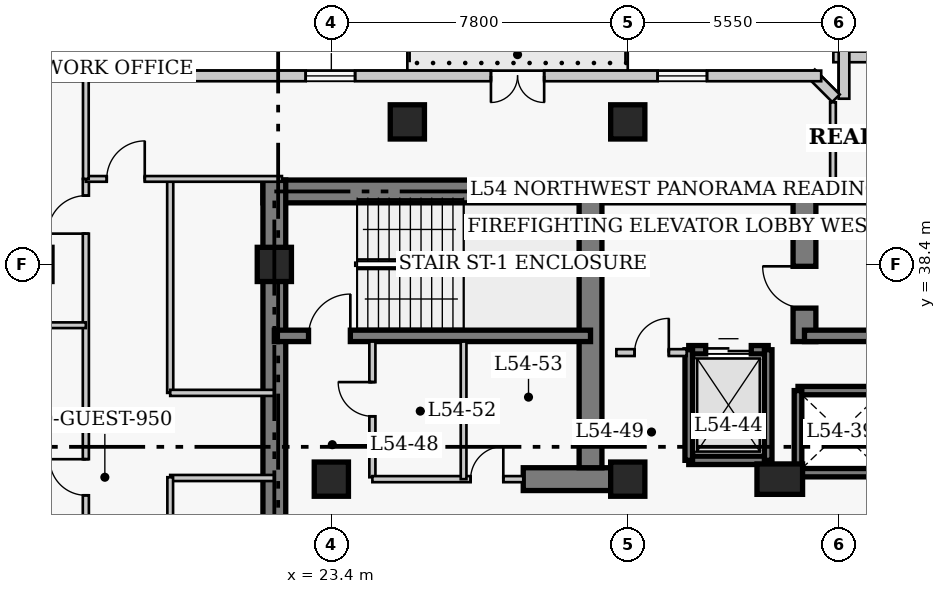
"""IFC4 building model, lengths in metres.
Left out: names, types, materials, properties, quantities, classifications, styles, units other than length and angle.
Written with IfcOpenShell. Run it as: python <this file> out.ifc"""

import sys

from ifc_helpers import new_model, si_unit, direction, frame, frame_2d, origin, origin_2d, place, context, subcontext, project, spatial, rectangle, extrude, element, fill, save


model = new_model("IFC4")
c1 = context("Model", 3, precision=1e-05, world=origin(), true_north=direction((0.0, 1.0)))
c2 = subcontext(c1, "Body", "Model", "MODEL_VIEW")
j1 = project(units=[si_unit("LENGTHUNIT", "METRE"), si_unit("PLANEANGLEUNIT", "RADIAN")], contexts=[c1])
p1 = place(None, origin())
s1 = spatial("IfcSite", under=j1, at=p1, CompositionType="ELEMENT")
p2 = place(p1, origin())
s2 = spatial("IfcBuilding", under=s1, at=p2, CompositionType="ELEMENT")
p3 = place(p2, frame((0.0, 0.0, 216.3)))
s3 = spatial("IfcBuildingStorey", under=s2, at=p3, CompositionType="ELEMENT", Elevation=216.3)
p4 = place(p3, frame((21.6, 40.32, 0.0), z_axis=(0.0, 0.0, 1.0), x_axis=(1.0, 0.0, 0.0)))
e1 = element("IfcWall", 1, at=p4, inside=s3, PredefinedType="SHEAR", context=c2, shape_type="SweptSolid", body=[
    extrude(rectangle(XDim=14.25, YDim=0.6, at=frame_2d((7.125, 0.0))), origin(), (0.0, 0.0, 1.0), 3.9),
])
p5 = place(p3, frame((35.85, 40.32, 0.0), z_axis=(0.0, 0.0, 1.0), x_axis=(1.0, 0.0, 0.0)))
e2 = element("IfcWall", 2, at=p5, inside=s3, PredefinedType="SHEAR", context=c2, shape_type="SweptSolid", body=[
    extrude(rectangle(XDim=12.6, YDim=0.6, at=frame_2d((6.3, 0.0))), origin(), (0.0, 0.0, 1.0), 3.9),
])
p6 = place(p3, frame((21.9, 27.05, 0.0), z_axis=(0.0, 0.0, 1.0), x_axis=(0.0, 1.0, 0.0)))
e3 = element("IfcWall", 3, at=p6, inside=s3, PredefinedType="SHEAR", context=c2, shape_type="SweptSolid", body=[
    extrude(rectangle(XDim=13.57, YDim=0.6, at=frame_2d((6.785, 0.0))), origin(), (0.0, 0.0, 1.0), 3.9),
])
p7 = place(p3, frame((28.45, 32.75, 0.0), z_axis=(0.0, 0.0, 1.0), x_axis=(1.0, 0.0, 0.0)))
e4 = element("IfcWall", 4, at=p7, inside=s3, PredefinedType="SHEAR", context=c2, shape_type="SweptSolid", body=[
    extrude(rectangle(XDim=2.4, YDim=0.6, at=frame_2d((1.2, 0.0))), origin(), (0.0, 0.0, 1.0), 3.9),
])
p8 = place(p3, frame((30.22, 33.05, 0.0), z_axis=(0.0, 0.0, 1.0), x_axis=(0.0, 1.0, 0.0)))
e5 = element("IfcWall", 5, at=p8, inside=s3, PredefinedType="SHEAR", context=c2, shape_type="SweptSolid", body=[
    extrude(rectangle(XDim=7.27, YDim=0.6, at=frame_2d((3.635, 0.0))), origin(), (0.0, 0.0, 1.0), 3.9),
])
p9 = place(p3, frame((35.85, 36.37, 0.0), z_axis=(0.0, 0.0, 1.0), x_axis=(0.0, 1.0, 0.0)))
e6 = element("IfcWall", 6, at=p9, inside=s3, PredefinedType="SHEAR", context=c2, shape_type="SweptSolid", body=[
    extrude(rectangle(XDim=3.95, YDim=0.6, at=frame_2d((1.975, 0.0))), origin(), (0.0, 0.0, 1.0), 3.9),
])
p10 = place(p9, frame((0.88, 0.0, 0.0)))
e7 = element("IfcOpeningElement", 7, at=p10, cuts=e6, PredefinedType="OPENING", context=c2, shape_type="SweptSolid", body=[
    extrude(rectangle(XDim=1.1, YDim=2.15, at=frame_2d((0.55, 1.075))), frame((0.0, 0.31, 0.0), z_axis=(0.0, -1.0, 0.0), x_axis=(1.0, 0.0, 0.0)), (0.0, 0.0, 1.0), 0.62),
])
p11 = place(p3, frame((21.9, 36.52, 0.0), z_axis=(0.0, 0.0, 1.0), x_axis=(1.0, 0.0, 0.0)))
e8 = element("IfcWall", 8, at=p11, inside=s3, PredefinedType="SHEAR", context=c2, shape_type="SweptSolid", body=[
    extrude(rectangle(XDim=8.32, YDim=0.3, at=frame_2d((4.16, 0.0))), origin(), (0.0, 0.0, 1.0), 3.9),
])
p12 = place(p11, frame((0.9, 0.0, 0.0)))
e9 = element("IfcOpeningElement", 9, at=p12, cuts=e8, PredefinedType="OPENING", context=c2, shape_type="SweptSolid", body=[
    extrude(rectangle(XDim=1.1, YDim=2.15, at=frame_2d((0.55, 1.075))), frame((0.0, 0.16, 0.0), z_axis=(0.0, -1.0, 0.0), x_axis=(1.0, 0.0, 0.0)), (0.0, 0.0, 1.0), 0.32),
])
p13 = place(p3, frame((35.85, 36.52, 0.0), z_axis=(0.0, 0.0, 1.0), x_axis=(1.0, 0.0, 0.0)))
e10 = element("IfcWall", 10, at=p13, inside=s3, PredefinedType="SHEAR", context=c2, shape_type="SweptSolid", body=[
    extrude(rectangle(XDim=8.33, YDim=0.3, at=frame_2d((4.165, 0.0))), origin(), (0.0, 0.0, 1.0), 3.9),
])
for number, where, z_axis, x_axis in (
    (11, (21.9, 38.4, 0.0), (0.0, 0.0, 1.0), (1.0, 0.0, 0.0)),
    (12, (23.4, 32.75, 0.0), (0.0, 0.0, 1.0), (1.0, 0.0, 0.0)),
    (13, (31.2, 32.75, 0.0), (0.0, 0.0, 1.0), (1.0, 0.0, 0.0)),
):
    element("IfcColumn", number, at=place(p3, frame(where, z_axis=z_axis, x_axis=x_axis)), inside=s3, PredefinedType="COLUMN", context=c2, shape_type="SweptSolid", body=[
        extrude(rectangle(XDim=0.9, YDim=0.9, at=origin_2d()), origin(), (0.0, 0.0, 1.0), 3.9),
    ])
p14 = place(p3, frame((35.2, 32.75, 0.0), z_axis=(0.0, 0.0, 1.0), x_axis=(1.0, 0.0, 0.0)))
e14 = element("IfcColumn", 14, at=p14, inside=s3, PredefinedType="COLUMN", context=c2, shape_type="SweptSolid", body=[
    extrude(rectangle(XDim=1.2, YDim=0.8, at=origin_2d()), origin(), (0.0, 0.0, 1.0), 3.9),
])
for number, where, z_axis, x_axis in (
    (15, (25.4, 42.15, 0.0), (0.0, 0.0, 1.0), (1.0, 0.0, 0.0)),
    (16, (31.2, 42.15, 0.0), (0.0, 0.0, 1.0), (1.0, 0.0, 0.0)),
):
    element("IfcColumn", number, at=place(p3, frame(where, z_axis=z_axis, x_axis=x_axis)), inside=s3, PredefinedType="COLUMN", context=c2, shape_type="SweptSolid", body=[
        extrude(rectangle(XDim=0.9, YDim=0.9, at=origin_2d()), origin(), (0.0, 0.0, 1.0), 3.9),
    ])
p15 = place(p3, frame((41.39, 43.86, 0.0), z_axis=(0.0, 0.0, 1.0), x_axis=(-1.0, 0.0, 0.0)))
e17 = element("IfcWall", 17, at=p15, inside=s3, PredefinedType="SOLIDWALL", context=c2, shape_type="SweptSolid", body=[
    extrude(rectangle(XDim=4.78, YDim=0.28, at=frame_2d((2.39, 0.0))), origin(), (0.0, 0.0, 1.0), 3.65),
])
p16 = place(p15, frame((1.74, 0.0, 0.85)))
e18 = element("IfcOpeningElement", 18, at=p16, cuts=e17, PredefinedType="OPENING", context=c2, shape_type="SweptSolid", body=[
    extrude(rectangle(XDim=1.3, YDim=1.7, at=frame_2d((0.65, 0.85))), frame((0.0, 0.15, 0.0), z_axis=(0.0, -1.0, 0.0), x_axis=(1.0, 0.0, 0.0)), (0.0, 0.0, 1.0), 0.3),
])
p17 = place(p3, frame((36.89, 44.14, 0.0), z_axis=(0.0, 0.0, 1.0), x_axis=(0.0, -1.0, 0.0)))
e19 = element("IfcWall", 19, at=p17, inside=s3, PredefinedType="SOLIDWALL", context=c2, shape_type="SweptSolid", body=[
    extrude(rectangle(XDim=1.38, YDim=0.28, at=frame_2d((0.69, 0.0))), origin(), (0.0, 0.0, 1.0), 3.65),
])
p18 = place(p3, frame((36.679, 42.773, 0.0), z_axis=(0.0, 0.0, 1.0), x_axis=(-0.707106781187, 0.707106781187, 0.0)))
e20 = element("IfcWall", 20, at=p18, inside=s3, PredefinedType="SOLIDWALL", context=c2, shape_type="SweptSolid", body=[
    extrude(rectangle(XDim=0.928, YDim=0.28, at=frame_2d((0.464, 0.0))), origin(), (0.0, 0.0, 1.0), 3.65),
])
p19 = place(p3, frame((36.29, 43.36, 0.0), z_axis=(0.0, 0.0, 1.0), x_axis=(-1.0, 0.0, 0.0)))
e21 = element("IfcWall", 21, at=p19, inside=s3, PredefinedType="SOLIDWALL", context=c2, shape_type="SweptSolid", body=[
    extrude(rectangle(XDim=25.83, YDim=0.28, at=frame_2d((12.915, 0.0))), origin(), (0.0, 0.0, 1.0), 3.65),
])
p20 = place(p19, frame((7.29, 0.0, 0.0)))
e22 = element("IfcOpeningElement", 22, at=p20, cuts=e21, PredefinedType="OPENING", context=c2, shape_type="SweptSolid", body=[
    extrude(rectangle(XDim=1.4, YDim=2.15, at=frame_2d((0.7, 1.075))), frame((0.0, 0.15, 0.0), z_axis=(0.0, -1.0, 0.0), x_axis=(1.0, 0.0, 0.0)), (0.0, 0.0, 1.0), 0.3),
])
p21 = place(p19, frame((3.005, 0.0, 0.85)))
e23 = element("IfcOpeningElement", 23, at=p21, cuts=e21, PredefinedType="OPENING", context=c2, shape_type="SweptSolid", body=[
    extrude(rectangle(XDim=1.3, YDim=1.7, at=frame_2d((0.65, 0.85))), frame((0.0, 0.15, 0.0), z_axis=(0.0, -1.0, 0.0), x_axis=(1.0, 0.0, 0.0)), (0.0, 0.0, 1.0), 0.3),
])
p22 = place(p19, frame((12.265, 0.0, 0.85)))
e24 = element("IfcOpeningElement", 24, at=p22, cuts=e21, PredefinedType="OPENING", context=c2, shape_type="SweptSolid", body=[
    extrude(rectangle(XDim=1.3, YDim=1.7, at=frame_2d((0.65, 0.85))), frame((0.0, 0.15, 0.0), z_axis=(0.0, -1.0, 0.0), x_axis=(1.0, 0.0, 0.0)), (0.0, 0.0, 1.0), 0.3),
])
p23 = place(p19, frame((20.875, 0.0, 0.85)))
e25 = element("IfcOpeningElement", 25, at=p23, cuts=e21, PredefinedType="OPENING", context=c2, shape_type="SweptSolid", body=[
    extrude(rectangle(XDim=1.3, YDim=1.7, at=frame_2d((0.65, 0.85))), frame((0.0, 0.15, 0.0), z_axis=(0.0, -1.0, 0.0), x_axis=(1.0, 0.0, 0.0)), (0.0, 0.0, 1.0), 0.3),
])
for number, where, z_axis, x_axis in (
    (26, (35.68, 35.08, 0.0), (0.0, 0.0, 1.0), (1.0, 0.0, 0.0)),
    (27, (35.68, 32.92, 0.0), (0.0, 0.0, 1.0), (1.0, 0.0, 0.0)),
):
    element("IfcWall", number, at=place(p3, frame(where, z_axis=z_axis, x_axis=x_axis)), inside=s3, PredefinedType="SHEAR", context=c2, shape_type="SweptSolid", body=[
        extrude(rectangle(XDim=2.32, YDim=0.22, at=frame_2d((1.16, 0.0))), origin(), (0.0, 0.0, 1.0), 3.9),
    ])
p24 = place(p3, frame((35.68, 32.92, 0.0), z_axis=(0.0, 0.0, 1.0), x_axis=(0.0, 1.0, 0.0)))
e28 = element("IfcWall", 28, at=p24, inside=s3, PredefinedType="SHEAR", context=c2, shape_type="SweptSolid", body=[
    extrude(rectangle(XDim=2.16, YDim=0.2, at=frame_2d((1.08, 0.0))), origin(), (0.0, 0.0, 1.0), 3.9),
])
p25 = place(p3, frame((32.805, 36.155, 0.0), z_axis=(0.0, 0.0, 1.0), x_axis=(1.0, 0.0, 0.0)))
e29 = element("IfcWall", 29, at=p25, inside=s3, PredefinedType="SHEAR", context=c2, shape_type="SweptSolid", body=[
    extrude(rectangle(XDim=2.09, YDim=0.22, at=frame_2d((1.045, 0.0))), origin(), (0.0, 0.0, 1.0), 3.9),
])
p26 = place(p25, frame((0.445, 0.0, 0.0)))
e30 = element("IfcOpeningElement", 30, at=p26, cuts=e29, PredefinedType="OPENING", context=c2, shape_type="SweptSolid", body=[
    extrude(rectangle(XDim=1.2, YDim=2.15, at=frame_2d((0.6, 1.075))), frame((0.0, 0.12, 0.0), z_axis=(0.0, -1.0, 0.0), x_axis=(1.0, 0.0, 0.0)), (0.0, 0.0, 1.0), 0.24),
])
p27 = place(p3, frame((32.805, 33.245, 0.0), z_axis=(0.0, 0.0, 1.0), x_axis=(1.0, 0.0, 0.0)))
e31 = element("IfcWall", 31, at=p27, inside=s3, PredefinedType="SHEAR", context=c2, shape_type="SweptSolid", body=[
    extrude(rectangle(XDim=2.09, YDim=0.22, at=frame_2d((1.045, 0.0))), origin(), (0.0, 0.0, 1.0), 3.9),
])
for number, where, z_axis, x_axis in (
    (32, (32.805, 33.245, 0.0), (0.0, 0.0, 1.0), (0.0, 1.0, 0.0)),
    (33, (34.895, 33.245, 0.0), (0.0, 0.0, 1.0), (0.0, 1.0, 0.0)),
):
    element("IfcWall", number, at=place(p3, frame(where, z_axis=z_axis, x_axis=x_axis)), inside=s3, PredefinedType="SHEAR", context=c2, shape_type="SweptSolid", body=[
        extrude(rectangle(XDim=2.91, YDim=0.2, at=frame_2d((1.455, 0.0))), origin(), (0.0, 0.0, 1.0), 3.9),
    ])
p28 = place(p3, frame((30.9, 36.08, 0.0), z_axis=(0.0, 0.0, 1.0), x_axis=(1.0, 0.0, 0.0)))
e34 = element("IfcWall", 34, at=p28, inside=s3, PredefinedType="PARTITIONING", context=c2, shape_type="SweptSolid", body=[
    extrude(rectangle(XDim=1.85, YDim=0.18, at=frame_2d((0.925, 0.0))), origin(), (0.0, 0.0, 1.0), 3.65),
])
p29 = place(p28, frame((0.48, 0.0, 0.0)))
e35 = element("IfcOpeningElement", 35, at=p29, cuts=e34, PredefinedType="OPENING", context=c2, shape_type="SweptSolid", body=[
    extrude(rectangle(XDim=0.9, YDim=2.15, at=frame_2d((0.45, 1.075))), frame((0.0, 0.1, 0.0), z_axis=(0.0, -1.0, 0.0), x_axis=(1.0, 0.0, 0.0)), (0.0, 0.0, 1.0), 0.2),
])
p30 = place(p3, frame((24.48, 32.8, 0.0), z_axis=(0.0, 0.0, 1.0), x_axis=(0.0, 1.0, 0.0)))
e36 = element("IfcWall", 36, at=p30, inside=s3, PredefinedType="PARTITIONING", context=c2, shape_type="SweptSolid", body=[
    extrude(rectangle(XDim=3.57, YDim=0.16, at=frame_2d((1.785, 0.0))), origin(), (0.0, 0.0, 1.0), 3.65),
])
p31 = place(p30, frame((1.604, 0.0, 0.0)))
e37 = element("IfcOpeningElement", 37, at=p31, cuts=e36, PredefinedType="OPENING", context=c2, shape_type="SweptSolid", body=[
    extrude(rectangle(XDim=0.9, YDim=2.1, at=frame_2d((0.45, 1.05))), frame((0.0, 0.09, 0.0), z_axis=(0.0, -1.0, 0.0), x_axis=(1.0, 0.0, 0.0)), (0.0, 0.0, 1.0), 0.18),
])
p32 = place(p3, frame((24.48, 32.75, 0.0), z_axis=(0.0, 0.0, 1.0), x_axis=(1.0, 0.0, 0.0)))
e38 = element("IfcWall", 38, at=p32, inside=s3, PredefinedType="PARTITIONING", context=c2, shape_type="SweptSolid", body=[
    extrude(rectangle(XDim=3.97, YDim=0.16, at=frame_2d((1.985, 0.0))), origin(), (0.0, 0.0, 1.0), 3.65),
])
p33 = place(p32, frame((2.585, 0.0, 0.0)))
e39 = element("IfcOpeningElement", 39, at=p33, cuts=e38, PredefinedType="OPENING", context=c2, shape_type="SweptSolid", body=[
    extrude(rectangle(XDim=0.86, YDim=2.05, at=frame_2d((0.43, 1.025))), frame((0.0, 0.09, 0.0), z_axis=(0.0, -1.0, 0.0), x_axis=(1.0, 0.0, 0.0)), (0.0, 0.0, 1.0), 0.18),
])
p34 = place(p3, frame((26.88, 32.75, 0.0), z_axis=(0.0, 0.0, 1.0), x_axis=(0.0, 1.0, 0.0)))
e40 = element("IfcWall", 40, at=p34, inside=s3, PredefinedType="PARTITIONING", context=c2, shape_type="SweptSolid", body=[
    extrude(rectangle(XDim=3.62, YDim=0.15, at=frame_2d((1.81, 0.0))), origin(), (0.0, 0.0, 1.0), 3.65),
])
p35 = place(p3, frame((16.94, 7.55, 0.0), z_axis=(0.0, 0.0, 1.0), x_axis=(0.0, 1.0, 0.0)))
e41 = element("IfcWall", 41, at=p35, inside=s3, PredefinedType="PARTITIONING", context=c2, shape_type="SweptSolid", body=[
    extrude(rectangle(XDim=33.1, YDim=0.16, at=frame_2d((16.55, 0.0))), origin(), (0.0, 0.0, 1.0), 3.65),
])
p36 = place(p35, frame((0.46, 0.0, 0.0)))
e42 = element("IfcOpeningElement", 42, at=p36, cuts=e41, PredefinedType="OPENING", context=c2, shape_type="SweptSolid", body=[
    extrude(rectangle(XDim=0.95, YDim=2.1, at=frame_2d((0.475, 1.05))), frame((0.0, 0.09, 0.0), z_axis=(0.0, -1.0, 0.0), x_axis=(1.0, 0.0, 0.0)), (0.0, 0.0, 1.0), 0.18),
])
p37 = place(p35, frame((7.575, 0.0, 0.0)))
e43 = element("IfcOpeningElement", 43, at=p37, cuts=e41, PredefinedType="OPENING", context=c2, shape_type="SweptSolid", body=[
    extrude(rectangle(XDim=0.95, YDim=2.1, at=frame_2d((0.475, 1.05))), frame((0.0, 0.09, 0.0), z_axis=(0.0, -1.0, 0.0), x_axis=(1.0, 0.0, 0.0)), (0.0, 0.0, 1.0), 0.18),
])
p38 = place(p35, frame((16.375, 0.0, 0.0)))
e44 = element("IfcOpeningElement", 44, at=p38, cuts=e41, PredefinedType="OPENING", context=c2, shape_type="SweptSolid", body=[
    extrude(rectangle(XDim=0.95, YDim=2.1, at=frame_2d((0.475, 1.05))), frame((0.0, 0.09, 0.0), z_axis=(0.0, -1.0, 0.0), x_axis=(1.0, 0.0, 0.0)), (0.0, 0.0, 1.0), 0.18),
])
p39 = place(p35, frame((24.775, 0.0, 0.0)))
e45 = element("IfcOpeningElement", 45, at=p39, cuts=e41, PredefinedType="OPENING", context=c2, shape_type="SweptSolid", body=[
    extrude(rectangle(XDim=0.95, YDim=2.1, at=frame_2d((0.475, 1.05))), frame((0.0, 0.09, 0.0), z_axis=(0.0, -1.0, 0.0), x_axis=(1.0, 0.0, 0.0)), (0.0, 0.0, 1.0), 0.18),
])
p40 = place(p35, frame((31.66, 0.0, 0.0)))
e46 = element("IfcOpeningElement", 46, at=p40, cuts=e41, PredefinedType="OPENING", context=c2, shape_type="SweptSolid", body=[
    extrude(rectangle(XDim=1.0, YDim=2.15, at=frame_2d((0.5, 1.075))), frame((0.0, 0.09, 0.0), z_axis=(0.0, -1.0, 0.0), x_axis=(1.0, 0.0, 0.0)), (0.0, 0.0, 1.0), 0.18),
])
p41 = place(p3, frame((19.16, 35.02, 0.0), z_axis=(0.0, 0.0, 1.0), x_axis=(0.0, 1.0, 0.0)))
e47 = element("IfcWall", 47, at=p41, inside=s3, PredefinedType="PARTITIONING", context=c2, shape_type="SweptSolid", body=[
    extrude(rectangle(XDim=5.63, YDim=0.16, at=frame_2d((2.815, 0.0))), origin(), (0.0, 0.0, 1.0), 3.65),
])
for number, where, z_axis, x_axis in (
    (48, (19.16, 35.02, 0.0), (0.0, 0.0, 1.0), (1.0, 0.0, 0.0)),
    (49, (19.16, 32.78, 0.0), (0.0, 0.0, 1.0), (1.0, 0.0, 0.0)),
):
    element("IfcWall", number, at=place(p3, frame(where, z_axis=z_axis, x_axis=x_axis)), inside=s3, PredefinedType="PARTITIONING", context=c2, shape_type="SweptSolid", body=[
        extrude(rectangle(XDim=2.74, YDim=0.16, at=frame_2d((1.37, 0.0))), origin(), (0.0, 0.0, 1.0), 3.65),
    ])
p42 = place(p3, frame((16.94, 40.65, 0.0), z_axis=(0.0, 0.0, 1.0), x_axis=(1.0, 0.0, 0.0)))
e50 = element("IfcWall", 50, at=p42, inside=s3, PredefinedType="PARTITIONING", context=c2, shape_type="SweptSolid", body=[
    extrude(rectangle(XDim=5.16, YDim=0.15, at=frame_2d((2.58, 0.0))), origin(), (0.0, 0.0, 1.0), 3.65),
])
p43 = place(p42, frame((0.55, 0.0, 0.0)))
e51 = element("IfcOpeningElement", 51, at=p43, cuts=e50, PredefinedType="OPENING", context=c2, shape_type="SweptSolid", body=[
    extrude(rectangle(XDim=1.0, YDim=2.15, at=frame_2d((0.5, 1.075))), frame((0.0, 0.085, 0.0), z_axis=(0.0, -1.0, 0.0), x_axis=(1.0, 0.0, 0.0)), (0.0, 0.0, 1.0), 0.17),
])
p44 = place(p3, frame((19.16, 18.51, 0.0), z_axis=(0.0, 0.0, 1.0), x_axis=(0.0, 1.0, 0.0)))
e52 = element("IfcWall", 52, at=p44, inside=s3, PredefinedType="PARTITIONING", context=c2, shape_type="SweptSolid", body=[
    extrude(rectangle(XDim=14.29, YDim=0.15, at=frame_2d((7.145, 0.0))), origin(), (0.0, 0.0, 1.0), 3.65),
])
p45 = place(p3, frame((16.94, 40.65, 0.0), z_axis=(0.0, 0.0, 1.0), x_axis=(0.0, 1.0, 0.0)))
e53 = element("IfcWall", 53, at=p45, inside=s3, PredefinedType="PARTITIONING", context=c2, shape_type="SweptSolid", body=[
    extrude(rectangle(XDim=2.83, YDim=0.15, at=frame_2d((1.415, 0.0))), origin(), (0.0, 0.0, 1.0), 3.65),
])
p46 = place(p3, frame((36.6, 40.32, 0.0), z_axis=(0.0, 0.0, 1.0), x_axis=(0.0, 1.0, 0.0)))
e54 = element("IfcWall", 54, at=p46, inside=s3, PredefinedType="PARTITIONING", context=c2, shape_type="SweptSolid", body=[
    extrude(rectangle(XDim=2.345, YDim=0.15, at=frame_2d((1.172, 0.0))), origin(), (0.0, 0.0, 1.0), 3.65),
])
p47 = place(p3, frame((14.45, 36.8, 0.0), z_axis=(0.0, 0.0, 1.0), x_axis=(1.0, 0.0, 0.0)))
e55 = element("IfcWall", 55, at=p47, inside=s3, PredefinedType="PARTITIONING", context=c2, shape_type="SweptSolid", body=[
    extrude(rectangle(XDim=2.49, YDim=0.15, at=frame_2d((1.245, 0.0))), origin(), (0.0, 0.0, 1.0), 3.65),
])
p48 = place(p20, origin())
e56 = element("IfcDoor", 56, at=p48, inside=s3, OperationType="DOUBLE_DOOR_SINGLE_SWING", PredefinedType="DOOR", context=c2, shape_type="SweptSolid", body=[
    extrude(rectangle(XDim=1.4, YDim=2.15, at=frame_2d((0.7, 1.075))), frame((0.0, 0.025, 0.0), z_axis=(0.0, -1.0, 0.0), x_axis=(1.0, 0.0, 0.0)), (0.0, 0.0, 1.0), 0.05),
])
fill(e22, e56)
p49 = place(p21, origin())
e57 = element("IfcWindow", 57, at=p49, inside=s3, PartitioningType="SINGLE_PANEL", PredefinedType="WINDOW", context=c2, shape_type="SweptSolid", body=[
    extrude(rectangle(XDim=1.3, YDim=1.7, at=frame_2d((0.65, 0.85))), frame((0.0, 0.03, 0.0), z_axis=(0.0, -1.0, 0.0), x_axis=(1.0, 0.0, 0.0)), (0.0, 0.0, 1.0), 0.06),
])
fill(e23, e57)
p50 = place(p22, origin())
e58 = element("IfcWindow", 58, at=p50, inside=s3, PartitioningType="SINGLE_PANEL", PredefinedType="WINDOW", context=c2, shape_type="SweptSolid", body=[
    extrude(rectangle(XDim=1.3, YDim=1.7, at=frame_2d((0.65, 0.85))), frame((0.0, 0.03, 0.0), z_axis=(0.0, -1.0, 0.0), x_axis=(1.0, 0.0, 0.0)), (0.0, 0.0, 1.0), 0.06),
])
fill(e24, e58)
p51 = place(p26, origin())
e59 = element("IfcDoor", 59, at=p51, inside=s3, OperationType="DOUBLE_DOOR_SLIDING", PredefinedType="DOOR", context=c2, shape_type="SweptSolid", body=[
    extrude(rectangle(XDim=1.2, YDim=2.15, at=frame_2d((0.6, 1.075))), frame((0.0, 0.025, 0.0), z_axis=(0.0, -1.0, 0.0), x_axis=(1.0, 0.0, 0.0)), (0.0, 0.0, 1.0), 0.05),
])
fill(e30, e59)
p52 = place(p29, origin())
e60 = element("IfcDoor", 60, at=p52, inside=s3, OperationType="SINGLE_SWING_RIGHT", PredefinedType="DOOR", context=c2, shape_type="SweptSolid", body=[
    extrude(rectangle(XDim=0.9, YDim=2.15, at=frame_2d((0.45, 1.075))), frame((0.0, 0.025, 0.0), z_axis=(0.0, -1.0, 0.0), x_axis=(1.0, 0.0, 0.0)), (0.0, 0.0, 1.0), 0.05),
])
fill(e35, e60)
p53 = place(p31, origin())
e61 = element("IfcDoor", 61, at=p53, inside=s3, OperationType="SINGLE_SWING_RIGHT", PredefinedType="DOOR", context=c2, shape_type="SweptSolid", body=[
    extrude(rectangle(XDim=0.9, YDim=2.1, at=frame_2d((0.45, 1.05))), frame((0.0, 0.025, 0.0), z_axis=(0.0, -1.0, 0.0), x_axis=(1.0, 0.0, 0.0)), (0.0, 0.0, 1.0), 0.05),
])
fill(e37, e61)
p54 = place(p33, origin())
e62 = element("IfcDoor", 62, at=p54, inside=s3, OperationType="SINGLE_SWING_RIGHT", PredefinedType="DOOR", context=c2, shape_type="SweptSolid", body=[
    extrude(rectangle(XDim=0.86, YDim=2.05, at=frame_2d((0.43, 1.025))), frame((0.0, 0.025, 0.0), z_axis=(0.0, -1.0, 0.0), x_axis=(1.0, 0.0, 0.0)), (0.0, 0.0, 1.0), 0.05),
])
fill(e39, e62)
p55 = place(p43, origin())
e63 = element("IfcDoor", 63, at=p55, inside=s3, OperationType="SINGLE_SWING_RIGHT", PredefinedType="DOOR", context=c2, shape_type="SweptSolid", body=[
    extrude(rectangle(XDim=1.0, YDim=2.15, at=frame_2d((0.5, 1.075))), frame((0.0, 0.025, 0.0), z_axis=(0.0, -1.0, 0.0), x_axis=(1.0, 0.0, 0.0)), (0.0, 0.0, 1.0), 0.05),
])
fill(e51, e63)
p56 = place(p39, origin())
e64 = element("IfcDoor", 64, at=p56, inside=s3, OperationType="SINGLE_SWING_RIGHT", PredefinedType="DOOR", context=c2, shape_type="SweptSolid", body=[
    extrude(rectangle(XDim=0.95, YDim=2.1, at=frame_2d((0.475, 1.05))), frame((0.0, 0.025, 0.0), z_axis=(0.0, -1.0, 0.0), x_axis=(1.0, 0.0, 0.0)), (0.0, 0.0, 1.0), 0.05),
])
fill(e45, e64)
p57 = place(p40, origin())
e65 = element("IfcDoor", 65, at=p57, inside=s3, OperationType="SINGLE_SWING_LEFT", PredefinedType="DOOR", context=c2, shape_type="SweptSolid", body=[
    extrude(rectangle(XDim=1.0, YDim=2.15, at=frame_2d((0.5, 1.075))), frame((0.0, 0.025, 0.0), z_axis=(0.0, -1.0, 0.0), x_axis=(1.0, 0.0, 0.0)), (0.0, 0.0, 1.0), 0.05),
])
fill(e46, e65)
p58 = place(p12, origin())
e66 = element("IfcDoor", 66, at=p58, inside=s3, OperationType="SINGLE_SWING_RIGHT", PredefinedType="DOOR", context=c2, shape_type="SweptSolid", body=[
    extrude(rectangle(XDim=1.1, YDim=2.15, at=frame_2d((0.55, 1.075))), frame((0.0, 0.025, 0.0), z_axis=(0.0, -1.0, 0.0), x_axis=(1.0, 0.0, 0.0)), (0.0, 0.0, 1.0), 0.05),
])
fill(e9, e66)
p59 = place(p10, origin())
e67 = element("IfcDoor", 67, at=p59, inside=s3, OperationType="SINGLE_SWING_RIGHT", PredefinedType="DOOR", context=c2, shape_type="SweptSolid", body=[
    extrude(rectangle(XDim=1.1, YDim=2.15, at=frame_2d((0.55, 1.075))), frame((0.0, 0.025, 0.0), z_axis=(0.0, -1.0, 0.0), x_axis=(1.0, 0.0, 0.0)), (0.0, 0.0, 1.0), 0.05),
])
fill(e7, e67)
save(model, sys.argv[1])
